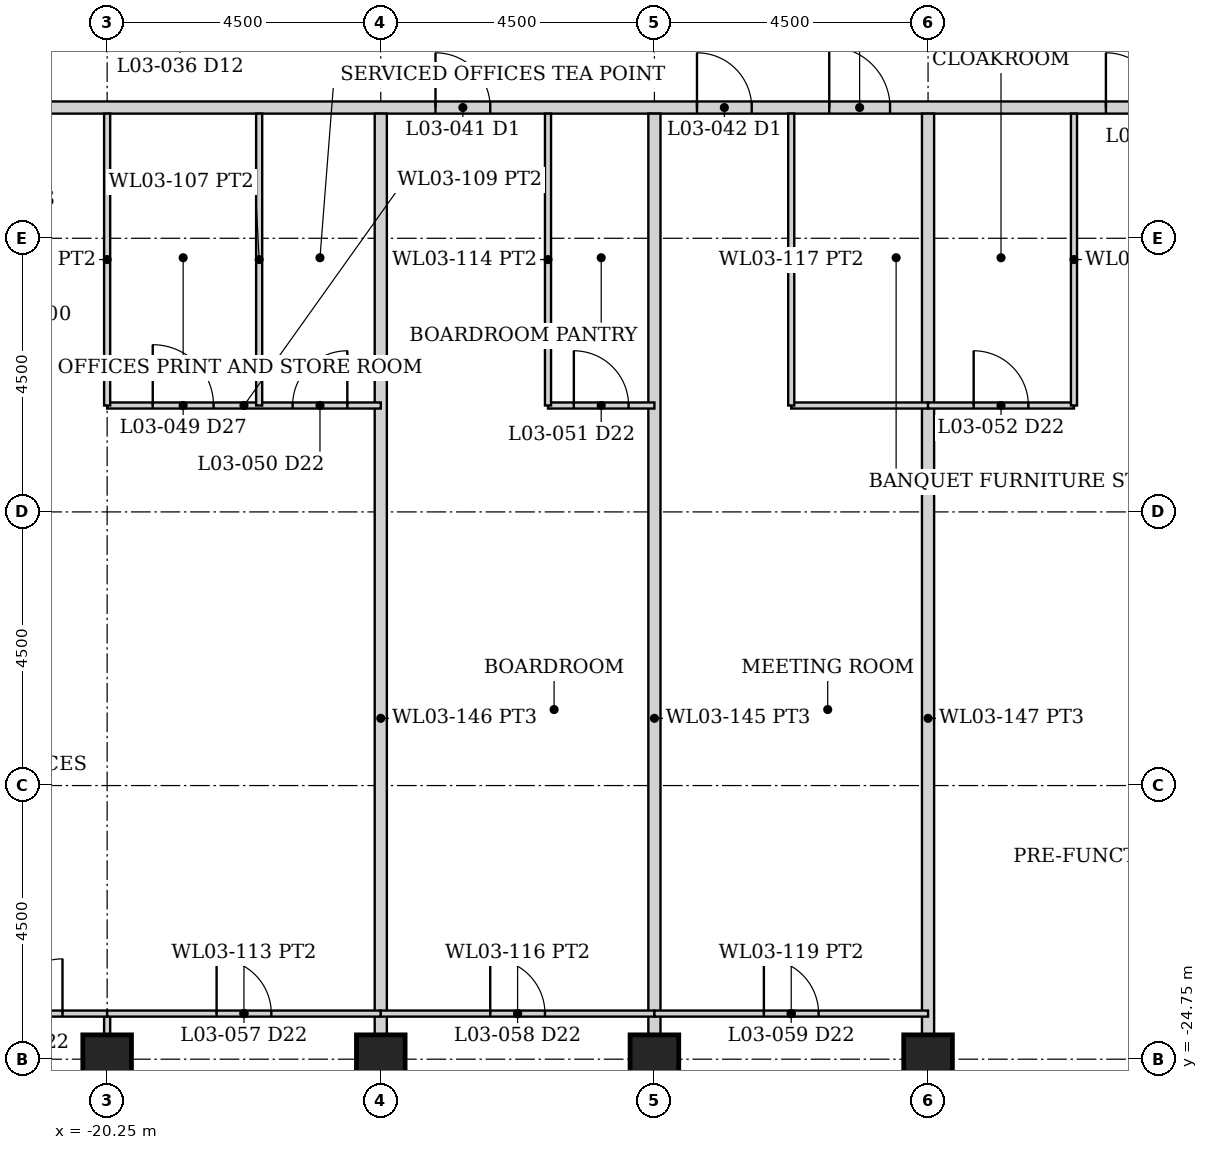
"""IFC4 building model, lengths in metres.
Left out: names, types, materials, properties, quantities, classifications, styles, units other than length and angle.
Written with IfcOpenShell. Run it as: python <this file> out.ifc"""

import sys

from ifc_helpers import new_model, si_unit, direction, frame, frame_2d, origin, origin_2d, place, context, subcontext, project, spatial, rectangle, hollow_rectangle, extrude, element, fill, save


model = new_model("IFC4")
c1 = context("Model", 3, precision=1e-05, world=origin(), true_north=direction((0.0, 1.0)))
c2 = subcontext(c1, "Body", "Model", "MODEL_VIEW")
j1 = project(units=[si_unit("LENGTHUNIT", "METRE"), si_unit("PLANEANGLEUNIT", "RADIAN")], contexts=[c1])
p1 = place(None, origin())
s1 = spatial("IfcSite", under=j1, at=p1, CompositionType="ELEMENT")
p2 = place(p1, origin())
s2 = spatial("IfcBuilding", under=s1, at=p2, CompositionType="ELEMENT")
p3 = place(p2, frame((0.0, 0.0, 16.0)))
s3 = spatial("IfcBuildingStorey", under=s2, at=p3, CompositionType="ELEMENT", Elevation=16.0)
for number, where, z_axis, x_axis in (
    (1, (-20.25, -24.75, 0.0), (0.0, 0.0, 1.0), (0.0, 1.0, 0.0)),
    (2, (-15.75, -24.75, 0.0), (0.0, 0.0, 1.0), (0.0, 1.0, 0.0)),
    (3, (-11.25, -24.75, 0.0), (0.0, 0.0, 1.0), (0.0, 1.0, 0.0)),
    (4, (-6.75, -24.75, 0.0), (0.0, 0.0, 1.0), (0.0, 1.0, 0.0)),
):
    element("IfcColumn", number, at=place(p3, frame(where, z_axis=z_axis, x_axis=x_axis)), inside=s3, PredefinedType="COLUMN", context=c2, shape_type="SweptSolid", body=[
        extrude(hollow_rectangle(XDim=0.8, YDim=0.8, WallThickness=0.08, at=origin_2d()), origin(), (0.0, 0.0, 1.0), 5.5),
    ])
p4 = place(p3, frame((-25.075, -9.1, 0.0), z_axis=(0.0, 0.0, 1.0), x_axis=(1.0, 0.0, 0.0)))
e5 = element("IfcWall", 5, at=p4, inside=s3, PredefinedType="PARTITIONING", context=c2, shape_type="SweptSolid", body=[
    extrude(rectangle(XDim=50.15, YDim=0.2, at=frame_2d((25.075, 0.0))), origin(), (0.0, 0.0, 1.0), 4.329),
])
p5 = place(p4, frame((2.125, 0.0, 0.0)))
e6 = element("IfcOpeningElement", 6, at=p5, cuts=e5, PredefinedType="OPENING", context=c2, shape_type="SweptSolid", body=[
    extrude(rectangle(XDim=0.9, YDim=2.1, at=frame_2d((0.45, 1.05))), frame((0.0, 0.11, 0.0), z_axis=(0.0, -1.0, 0.0), x_axis=(1.0, 0.0, 0.0)), (0.0, 0.0, 1.0), 0.22),
])
p6 = place(p4, frame((10.225, 0.0, 0.0)))
e7 = element("IfcOpeningElement", 7, at=p6, cuts=e5, PredefinedType="OPENING", context=c2, shape_type="SweptSolid", body=[
    extrude(rectangle(XDim=0.9, YDim=2.1, at=frame_2d((0.45, 1.05))), frame((0.0, 0.11, 0.0), z_axis=(0.0, -1.0, 0.0), x_axis=(1.0, 0.0, 0.0)), (0.0, 0.0, 1.0), 0.22),
])
p7 = place(p4, frame((16.7, 0.0, 0.0)))
e8 = element("IfcOpeningElement", 8, at=p7, cuts=e5, PredefinedType="OPENING", context=c2, shape_type="SweptSolid", body=[
    extrude(rectangle(XDim=1.0, YDim=2.1, at=frame_2d((0.5, 1.05))), frame((0.0, 0.11, 0.0), z_axis=(0.0, -1.0, 0.0), x_axis=(1.0, 0.0, 0.0)), (0.0, 0.0, 1.0), 0.22),
])
p8 = place(p4, frame((14.525, 0.0, 0.0)))
e9 = element("IfcOpeningElement", 9, at=p8, cuts=e5, PredefinedType="OPENING", context=c2, shape_type="SweptSolid", body=[
    extrude(rectangle(XDim=0.9, YDim=2.1, at=frame_2d((0.45, 1.05))), frame((0.0, 0.11, 0.0), z_axis=(0.0, -1.0, 0.0), x_axis=(1.0, 0.0, 0.0)), (0.0, 0.0, 1.0), 0.22),
])
p9 = place(p4, frame((21.25, 0.0, 0.0)))
e10 = element("IfcOpeningElement", 10, at=p9, cuts=e5, PredefinedType="OPENING", context=c2, shape_type="SweptSolid", body=[
    extrude(rectangle(XDim=0.9, YDim=2.1, at=frame_2d((0.45, 1.05))), frame((0.0, 0.11, 0.0), z_axis=(0.0, -1.0, 0.0), x_axis=(1.0, 0.0, 0.0)), (0.0, 0.0, 1.0), 0.22),
])
p10 = place(p4, frame((33.325, 0.0, 0.0)))
e11 = element("IfcOpeningElement", 11, at=p10, cuts=e5, PredefinedType="OPENING", context=c2, shape_type="SweptSolid", body=[
    extrude(rectangle(XDim=1.5, YDim=2.1, at=frame_2d((0.75, 1.05))), frame((0.0, 0.11, 0.0), z_axis=(0.0, -1.0, 0.0), x_axis=(1.0, 0.0, 0.0)), (0.0, 0.0, 1.0), 0.22),
])
p11 = place(p4, frame((36.95, 0.0, 0.0)))
e12 = element("IfcOpeningElement", 12, at=p11, cuts=e5, PredefinedType="OPENING", context=c2, shape_type="SweptSolid", body=[
    extrude(rectangle(XDim=1.0, YDim=2.1, at=frame_2d((0.5, 1.05))), frame((0.0, 0.11, 0.0), z_axis=(0.0, -1.0, 0.0), x_axis=(1.0, 0.0, 0.0)), (0.0, 0.0, 1.0), 0.22),
])
p12 = place(p4, frame((44.825, 0.0, 0.0)))
e13 = element("IfcOpeningElement", 13, at=p12, cuts=e5, PredefinedType="OPENING", context=c2, shape_type="SweptSolid", body=[
    extrude(rectangle(XDim=1.0, YDim=2.1, at=frame_2d((0.5, 1.05))), frame((0.0, 0.11, 0.0), z_axis=(0.0, -1.0, 0.0), x_axis=(1.0, 0.0, 0.0)), (0.0, 0.0, 1.0), 0.22),
])
p13 = place(p4, frame((39.225, 0.0, 0.0)))
e14 = element("IfcOpeningElement", 14, at=p13, cuts=e5, PredefinedType="OPENING", context=c2, shape_type="SweptSolid", body=[
    extrude(rectangle(XDim=0.9, YDim=2.1, at=frame_2d((0.45, 1.05))), frame((0.0, 0.11, 0.0), z_axis=(0.0, -1.0, 0.0), x_axis=(1.0, 0.0, 0.0)), (0.0, 0.0, 1.0), 0.22),
])
for number, where, z_axis, x_axis in (
    (15, (-15.75, -29.089, 0.0), (0.0, 0.0, 1.0), (0.0, 1.0, 0.0)),
    (16, (-11.25, -29.089, 0.0), (0.0, 0.0, 1.0), (0.0, 1.0, 0.0)),
    (17, (-6.75, -29.089, 0.0), (0.0, 0.0, 1.0), (0.0, 1.0, 0.0)),
):
    element("IfcWall", number, at=place(p3, frame(where, z_axis=z_axis, x_axis=x_axis)), inside=s3, PredefinedType="PARTITIONING", context=c2, shape_type="SweptSolid", body=[
        extrude(rectangle(XDim=19.889, YDim=0.2, at=frame_2d((9.944, 0.0))), origin(), (0.0, 0.0, 1.0), 4.329),
    ])
p14 = place(p3, frame((-20.25, -14.0, 0.0), z_axis=(0.0, 0.0, 1.0), x_axis=(1.0, 0.0, 0.0)))
e18 = element("IfcWall", 18, at=p14, inside=s3, PredefinedType="PARTITIONING", context=c2, shape_type="SweptSolid", body=[
    extrude(rectangle(XDim=4.5, YDim=0.1, at=frame_2d((2.25, 0.0))), origin(), (0.0, 0.0, 1.0), 4.329),
])
p15 = place(p14, frame((0.75, 0.0, 0.0)))
e19 = element("IfcOpeningElement", 19, at=p15, cuts=e18, PredefinedType="OPENING", context=c2, shape_type="SweptSolid", body=[
    extrude(rectangle(XDim=1.0, YDim=2.1, at=frame_2d((0.5, 1.05))), frame((0.0, 0.06, 0.0), z_axis=(0.0, -1.0, 0.0), x_axis=(1.0, 0.0, 0.0)), (0.0, 0.0, 1.0), 0.12),
])
p16 = place(p14, frame((3.05, 0.0, 0.0)))
e20 = element("IfcOpeningElement", 20, at=p16, cuts=e18, PredefinedType="OPENING", context=c2, shape_type="SweptSolid", body=[
    extrude(rectangle(XDim=0.9, YDim=2.1, at=frame_2d((0.45, 1.05))), frame((0.0, 0.06, 0.0), z_axis=(0.0, -1.0, 0.0), x_axis=(1.0, 0.0, 0.0)), (0.0, 0.0, 1.0), 0.12),
])
for number, where, z_axis, x_axis in (
    (21, (-20.25, -14.0, 0.0), (0.0, 0.0, 1.0), (0.0, 1.0, 0.0)),
    (22, (-17.75, -14.0, 0.0), (0.0, 0.0, 1.0), (0.0, 1.0, 0.0)),
):
    element("IfcWall", number, at=place(p3, frame(where, z_axis=z_axis, x_axis=x_axis)), inside=s3, PredefinedType="PARTITIONING", context=c2, shape_type="SweptSolid", body=[
        extrude(rectangle(XDim=4.8, YDim=0.1, at=frame_2d((2.4, 0.0))), origin(), (0.0, 0.0, 1.0), 4.329),
    ])
p17 = place(p3, frame((-20.25, -29.089, 0.0), z_axis=(0.0, 0.0, 1.0), x_axis=(0.0, 1.0, 0.0)))
e23 = element("IfcWall", 23, at=p17, inside=s3, PredefinedType="PARTITIONING", context=c2, shape_type="SweptSolid", body=[
    extrude(rectangle(XDim=5.089, YDim=0.1, at=frame_2d((2.544, 0.0))), origin(), (0.0, 0.0, 1.0), 4.329),
])
p18 = place(p3, frame((-24.75, -24.0, 0.0), z_axis=(0.0, 0.0, 1.0), x_axis=(1.0, 0.0, 0.0)))
e24 = element("IfcWall", 24, at=p18, inside=s3, PredefinedType="PARTITIONING", context=c2, shape_type="SweptSolid", body=[
    extrude(rectangle(XDim=4.5, YDim=0.1, at=frame_2d((2.25, 0.0))), origin(), (0.0, 0.0, 1.0), 4.329),
])
p19 = place(p18, frame((2.866, 0.0, 0.0)))
e25 = element("IfcOpeningElement", 25, at=p19, cuts=e24, PredefinedType="OPENING", context=c2, shape_type="SweptSolid", body=[
    extrude(rectangle(XDim=0.9, YDim=2.1, at=frame_2d((0.45, 1.05))), frame((0.0, 0.06, 0.0), z_axis=(0.0, -1.0, 0.0), x_axis=(1.0, 0.0, 0.0)), (0.0, 0.0, 1.0), 0.12),
])
p20 = place(p3, frame((-20.25, -24.0, 0.0), z_axis=(0.0, 0.0, 1.0), x_axis=(1.0, 0.0, 0.0)))
e26 = element("IfcWall", 26, at=p20, inside=s3, PredefinedType="PARTITIONING", context=c2, shape_type="SweptSolid", body=[
    extrude(rectangle(XDim=4.5, YDim=0.1, at=frame_2d((2.25, 0.0))), origin(), (0.0, 0.0, 1.0), 4.329),
])
p21 = place(p20, frame((1.8, 0.0, 0.0)))
e27 = element("IfcOpeningElement", 27, at=p21, cuts=e26, PredefinedType="OPENING", context=c2, shape_type="SweptSolid", body=[
    extrude(rectangle(XDim=0.9, YDim=2.1, at=frame_2d((0.45, 1.05))), frame((0.0, 0.06, 0.0), z_axis=(0.0, -1.0, 0.0), x_axis=(1.0, 0.0, 0.0)), (0.0, 0.0, 1.0), 0.12),
])
p22 = place(p3, frame((-13.0, -14.0, 0.0), z_axis=(0.0, 0.0, 1.0), x_axis=(1.0, 0.0, 0.0)))
e28 = element("IfcWall", 28, at=p22, inside=s3, PredefinedType="PARTITIONING", context=c2, shape_type="SweptSolid", body=[
    extrude(rectangle(XDim=1.75, YDim=0.1, at=frame_2d((0.875, 0.0))), origin(), (0.0, 0.0, 1.0), 4.329),
])
p23 = place(p22, frame((0.425, 0.0, 0.0)))
e29 = element("IfcOpeningElement", 29, at=p23, cuts=e28, PredefinedType="OPENING", context=c2, shape_type="SweptSolid", body=[
    extrude(rectangle(XDim=0.9, YDim=2.1, at=frame_2d((0.45, 1.05))), frame((0.0, 0.06, 0.0), z_axis=(0.0, -1.0, 0.0), x_axis=(1.0, 0.0, 0.0)), (0.0, 0.0, 1.0), 0.12),
])
p24 = place(p3, frame((-13.0, -14.0, 0.0), z_axis=(0.0, 0.0, 1.0), x_axis=(0.0, 1.0, 0.0)))
e30 = element("IfcWall", 30, at=p24, inside=s3, PredefinedType="PARTITIONING", context=c2, shape_type="SweptSolid", body=[
    extrude(rectangle(XDim=4.8, YDim=0.1, at=frame_2d((2.4, 0.0))), origin(), (0.0, 0.0, 1.0), 4.329),
])
p25 = place(p3, frame((-15.75, -24.0, 0.0), z_axis=(0.0, 0.0, 1.0), x_axis=(1.0, 0.0, 0.0)))
e31 = element("IfcWall", 31, at=p25, inside=s3, PredefinedType="PARTITIONING", context=c2, shape_type="SweptSolid", body=[
    extrude(rectangle(XDim=4.5, YDim=0.1, at=frame_2d((2.25, 0.0))), origin(), (0.0, 0.0, 1.0), 4.329),
])
p26 = place(p25, frame((1.8, 0.0, 0.0)))
e32 = element("IfcOpeningElement", 32, at=p26, cuts=e31, PredefinedType="OPENING", context=c2, shape_type="SweptSolid", body=[
    extrude(rectangle(XDim=0.9, YDim=2.1, at=frame_2d((0.45, 1.05))), frame((0.0, 0.06, 0.0), z_axis=(0.0, -1.0, 0.0), x_axis=(1.0, 0.0, 0.0)), (0.0, 0.0, 1.0), 0.12),
])
p27 = place(p3, frame((-9.0, -14.0, 0.0), z_axis=(0.0, 0.0, 1.0), x_axis=(1.0, 0.0, 0.0)))
e33 = element("IfcWall", 33, at=p27, inside=s3, PredefinedType="PARTITIONING", context=c2, shape_type="SweptSolid", body=[
    extrude(rectangle(XDim=2.25, YDim=0.1, at=frame_2d((1.125, 0.0))), origin(), (0.0, 0.0, 1.0), 4.329),
])
p28 = place(p3, frame((-9.0, -14.0, 0.0), z_axis=(0.0, 0.0, 1.0), x_axis=(0.0, 1.0, 0.0)))
e34 = element("IfcWall", 34, at=p28, inside=s3, PredefinedType="PARTITIONING", context=c2, shape_type="SweptSolid", body=[
    extrude(rectangle(XDim=4.8, YDim=0.1, at=frame_2d((2.4, 0.0))), origin(), (0.0, 0.0, 1.0), 4.329),
])
p29 = place(p3, frame((-11.25, -24.0, 0.0), z_axis=(0.0, 0.0, 1.0), x_axis=(1.0, 0.0, 0.0)))
e35 = element("IfcWall", 35, at=p29, inside=s3, PredefinedType="PARTITIONING", context=c2, shape_type="SweptSolid", body=[
    extrude(rectangle(XDim=4.5, YDim=0.1, at=frame_2d((2.25, 0.0))), origin(), (0.0, 0.0, 1.0), 4.329),
])
p30 = place(p29, frame((1.8, 0.0, 0.0)))
e36 = element("IfcOpeningElement", 36, at=p30, cuts=e35, PredefinedType="OPENING", context=c2, shape_type="SweptSolid", body=[
    extrude(rectangle(XDim=0.9, YDim=2.1, at=frame_2d((0.45, 1.05))), frame((0.0, 0.06, 0.0), z_axis=(0.0, -1.0, 0.0), x_axis=(1.0, 0.0, 0.0)), (0.0, 0.0, 1.0), 0.12),
])
p31 = place(p3, frame((-6.75, -14.0, 0.0), z_axis=(0.0, 0.0, 1.0), x_axis=(1.0, 0.0, 0.0)))
e37 = element("IfcWall", 37, at=p31, inside=s3, PredefinedType="PARTITIONING", context=c2, shape_type="SweptSolid", body=[
    extrude(rectangle(XDim=2.4, YDim=0.1, at=frame_2d((1.2, 0.0))), origin(), (0.0, 0.0, 1.0), 4.329),
])
p32 = place(p31, frame((0.75, 0.0, 0.0)))
e38 = element("IfcOpeningElement", 38, at=p32, cuts=e37, PredefinedType="OPENING", context=c2, shape_type="SweptSolid", body=[
    extrude(rectangle(XDim=0.9, YDim=2.1, at=frame_2d((0.45, 1.05))), frame((0.0, 0.06, 0.0), z_axis=(0.0, -1.0, 0.0), x_axis=(1.0, 0.0, 0.0)), (0.0, 0.0, 1.0), 0.12),
])
p33 = place(p3, frame((-4.35, -14.0, 0.0), z_axis=(0.0, 0.0, 1.0), x_axis=(0.0, 1.0, 0.0)))
e39 = element("IfcWall", 39, at=p33, inside=s3, PredefinedType="PARTITIONING", context=c2, shape_type="SweptSolid", body=[
    extrude(rectangle(XDim=4.8, YDim=0.1, at=frame_2d((2.4, 0.0))), origin(), (0.0, 0.0, 1.0), 4.329),
])
p34 = place(p15, origin())
e40 = element("IfcDoor", 40, at=p34, inside=s3, OperationType="SINGLE_SWING_LEFT", PredefinedType="DOOR", context=c2, shape_type="SweptSolid", body=[
    extrude(rectangle(XDim=1.0, YDim=2.1, at=frame_2d((0.5, 1.05))), frame((0.0, 0.025, 0.0), z_axis=(0.0, -1.0, 0.0), x_axis=(1.0, 0.0, 0.0)), (0.0, 0.0, 1.0), 0.05),
])
fill(e19, e40)
p35 = place(p16, origin())
e41 = element("IfcDoor", 41, at=p35, inside=s3, OperationType="SINGLE_SWING_RIGHT", PredefinedType="DOOR", context=c2, shape_type="SweptSolid", body=[
    extrude(rectangle(XDim=0.9, YDim=2.1, at=frame_2d((0.45, 1.05))), frame((0.0, 0.025, 0.0), z_axis=(0.0, -1.0, 0.0), x_axis=(1.0, 0.0, 0.0)), (0.0, 0.0, 1.0), 0.05),
])
fill(e20, e41)
p36 = place(p19, origin())
e42 = element("IfcDoor", 42, at=p36, inside=s3, OperationType="SINGLE_SWING_RIGHT", PredefinedType="DOOR", context=c2, shape_type="SweptSolid", body=[
    extrude(rectangle(XDim=0.9, YDim=2.1, at=frame_2d((0.45, 1.05))), frame((0.0, 0.025, 0.0), z_axis=(0.0, -1.0, 0.0), x_axis=(1.0, 0.0, 0.0)), (0.0, 0.0, 1.0), 0.05),
])
fill(e25, e42)
p37 = place(p21, origin())
e43 = element("IfcDoor", 43, at=p37, inside=s3, OperationType="SINGLE_SWING_LEFT", PredefinedType="DOOR", context=c2, shape_type="SweptSolid", body=[
    extrude(rectangle(XDim=0.9, YDim=2.1, at=frame_2d((0.45, 1.05))), frame((0.0, 0.025, 0.0), z_axis=(0.0, -1.0, 0.0), x_axis=(1.0, 0.0, 0.0)), (0.0, 0.0, 1.0), 0.05),
])
fill(e27, e43)
p38 = place(p23, origin())
e44 = element("IfcDoor", 44, at=p38, inside=s3, OperationType="SINGLE_SWING_LEFT", PredefinedType="DOOR", context=c2, shape_type="SweptSolid", body=[
    extrude(rectangle(XDim=0.9, YDim=2.1, at=frame_2d((0.45, 1.05))), frame((0.0, 0.025, 0.0), z_axis=(0.0, -1.0, 0.0), x_axis=(1.0, 0.0, 0.0)), (0.0, 0.0, 1.0), 0.05),
])
fill(e29, e44)
p39 = place(p26, origin())
e45 = element("IfcDoor", 45, at=p39, inside=s3, OperationType="SINGLE_SWING_LEFT", PredefinedType="DOOR", context=c2, shape_type="SweptSolid", body=[
    extrude(rectangle(XDim=0.9, YDim=2.1, at=frame_2d((0.45, 1.05))), frame((0.0, 0.025, 0.0), z_axis=(0.0, -1.0, 0.0), x_axis=(1.0, 0.0, 0.0)), (0.0, 0.0, 1.0), 0.05),
])
fill(e32, e45)
p40 = place(p6, origin())
e46 = element("IfcDoor", 46, at=p40, inside=s3, OperationType="SINGLE_SWING_LEFT", PredefinedType="DOOR", context=c2, shape_type="SweptSolid", body=[
    extrude(rectangle(XDim=0.9, YDim=2.1, at=frame_2d((0.45, 1.05))), frame((0.0, 0.025, 0.0), z_axis=(0.0, -1.0, 0.0), x_axis=(1.0, 0.0, 0.0)), (0.0, 0.0, 1.0), 0.05),
])
fill(e7, e46)
p41 = place(p7, origin())
e47 = element("IfcDoor", 47, at=p41, inside=s3, OperationType="SINGLE_SWING_LEFT", PredefinedType="DOOR", context=c2, shape_type="SweptSolid", body=[
    extrude(rectangle(XDim=1.0, YDim=2.1, at=frame_2d((0.5, 1.05))), frame((0.0, 0.025, 0.0), z_axis=(0.0, -1.0, 0.0), x_axis=(1.0, 0.0, 0.0)), (0.0, 0.0, 1.0), 0.05),
])
fill(e8, e47)
p42 = place(p30, origin())
e48 = element("IfcDoor", 48, at=p42, inside=s3, OperationType="SINGLE_SWING_LEFT", PredefinedType="DOOR", context=c2, shape_type="SweptSolid", body=[
    extrude(rectangle(XDim=0.9, YDim=2.1, at=frame_2d((0.45, 1.05))), frame((0.0, 0.025, 0.0), z_axis=(0.0, -1.0, 0.0), x_axis=(1.0, 0.0, 0.0)), (0.0, 0.0, 1.0), 0.05),
])
fill(e36, e48)
p43 = place(p8, origin())
e49 = element("IfcDoor", 49, at=p43, inside=s3, OperationType="SINGLE_SWING_LEFT", PredefinedType="DOOR", context=c2, shape_type="SweptSolid", body=[
    extrude(rectangle(XDim=0.9, YDim=2.1, at=frame_2d((0.45, 1.05))), frame((0.0, 0.025, 0.0), z_axis=(0.0, -1.0, 0.0), x_axis=(1.0, 0.0, 0.0)), (0.0, 0.0, 1.0), 0.05),
])
fill(e9, e49)
p44 = place(p32, origin())
e50 = element("IfcDoor", 50, at=p44, inside=s3, OperationType="SINGLE_SWING_LEFT", PredefinedType="DOOR", context=c2, shape_type="SweptSolid", body=[
    extrude(rectangle(XDim=0.9, YDim=2.1, at=frame_2d((0.45, 1.05))), frame((0.0, 0.025, 0.0), z_axis=(0.0, -1.0, 0.0), x_axis=(1.0, 0.0, 0.0)), (0.0, 0.0, 1.0), 0.05),
])
fill(e38, e50)
p45 = place(p9, origin())
e51 = element("IfcDoor", 51, at=p45, inside=s3, OperationType="SINGLE_SWING_LEFT", PredefinedType="DOOR", context=c2, shape_type="SweptSolid", body=[
    extrude(rectangle(XDim=0.9, YDim=2.1, at=frame_2d((0.45, 1.05))), frame((0.0, 0.025, 0.0), z_axis=(0.0, -1.0, 0.0), x_axis=(1.0, 0.0, 0.0)), (0.0, 0.0, 1.0), 0.05),
])
fill(e10, e51)
save(model, sys.argv[1])
